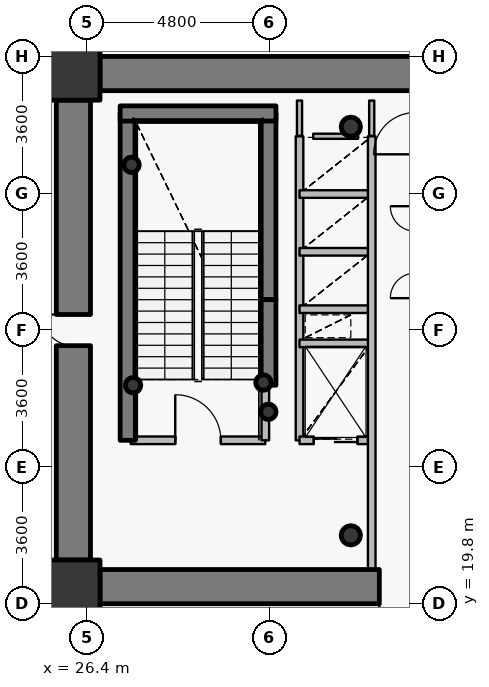
"""IFC4 building model, lengths in metres.
Left out: names, types, materials, properties, quantities, classifications, styles, units other than length and angle.
Written with IfcOpenShell. Run it as: python <this file> out.ifc"""

import sys

from ifc_helpers import new_model, si_unit, direction, frame, frame_2d, origin, origin_2d, place, context, subcontext, project, spatial, rectangle, hollow_circle, extrude, source, transform, mapped, element, fill, save


model = new_model("IFC4")
c1 = context("Model", 3, precision=1e-05, world=origin(), true_north=direction((0.0, 1.0)))
c2 = subcontext(c1, "Body", "Model", "MODEL_VIEW")
j1 = project(units=[si_unit("LENGTHUNIT", "METRE"), si_unit("PLANEANGLEUNIT", "RADIAN")], contexts=[c1])
p1 = place(None, origin())
s1 = spatial("IfcSite", under=j1, at=p1, CompositionType="ELEMENT")
p2 = place(p1, origin())
s2 = spatial("IfcBuilding", under=s1, at=p2, CompositionType="ELEMENT")
p3 = place(p2, frame((0.0, 0.0, 74.4)))
s3 = spatial("IfcBuildingStorey", under=s2, at=p3, CompositionType="ELEMENT", Elevation=74.4)
for number, where, z_axis, x_axis in (
    (1, (26.05, 20.25, 0.0), (0.0, 0.0, 1.0), (1.0, 0.0, 0.0)),
    (2, (26.05, 33.75, 0.0), (0.0, 0.0, 1.0), (1.0, 0.0, 0.0)),
):
    element("IfcColumn", number, at=place(p3, frame(where, z_axis=z_axis, x_axis=x_axis)), inside=s3, PredefinedType="COLUMN", context=c2, shape_type="SweptSolid", body=[
        extrude(rectangle(XDim=1.4, YDim=1.4, at=origin_2d()), origin(), (0.0, 0.0, 1.0), 4.2),
    ])
for number, where, z_axis, x_axis in (
    (3, (33.35, 21.6, 0.0), (0.0, 0.0, 1.0), (1.0, 0.0, 0.0)),
    (4, (33.35, 32.35, 0.0), (0.0, 0.0, 1.0), (1.0, 0.0, 0.0)),
):
    element("IfcColumn", number, at=place(p3, frame(where, z_axis=z_axis, x_axis=x_axis)), inside=s3, PredefinedType="COLUMN", context=c2, shape_type="SweptSolid", body=[
        extrude(hollow_circle(Radius=0.254, WallThickness=0.02, at=origin_2d()), origin(), (0.0, 0.0, 1.0), 4.2),
    ])
p4 = place(p3, frame((27.48, 24.1, 0.0), z_axis=(0.0, 0.0, 1.0), x_axis=(0.0, 1.0, 0.0)))
e5 = element("IfcWall", 5, at=p4, inside=s3, PredefinedType="SHEAR", context=c2, shape_type="SweptSolid", body=[
    extrude(rectangle(XDim=8.6, YDim=0.4, at=frame_2d((4.3, 0.0))), origin(), (0.0, 0.0, 1.0), 4.2),
])
p5 = place(p3, frame((31.18, 27.8, 0.0), z_axis=(0.0, 0.0, 1.0), x_axis=(0.0, 1.0, 0.0)))
e6 = element("IfcWall", 6, at=p5, inside=s3, PredefinedType="SHEAR", context=c2, shape_type="SweptSolid", body=[
    extrude(rectangle(XDim=4.9, YDim=0.4, at=frame_2d((2.45, 0.0))), origin(), (0.0, 0.0, 1.0), 4.2),
])
p6 = place(p3, frame((27.28, 32.7, 0.0), z_axis=(0.0, 0.0, 1.0), x_axis=(1.0, 0.0, 0.0)))
e7 = element("IfcWall", 7, at=p6, inside=s3, PredefinedType="SHEAR", context=c2, shape_type="SweptSolid", body=[
    extrude(rectangle(XDim=4.1, YDim=0.4, at=frame_2d((2.05, 0.0))), origin(), (0.0, 0.0, 1.0), 4.2),
])
for number, where, z_axis, x_axis in (
    (8, (27.58, 31.35, 0.0), (0.0, 0.0, 1.0), (1.0, 0.0, 0.0)),
    (9, (31.05, 25.62, 0.0), (0.0, 0.0, 1.0), (1.0, 0.0, 0.0)),
    (10, (31.18, 24.85, 0.0), (0.0, 0.0, 1.0), (1.0, 0.0, 0.0)),
    (11, (27.62, 25.55, 0.0), (0.0, 0.0, 1.0), (1.0, 0.0, 0.0)),
):
    element("IfcColumn", number, at=place(p3, frame(where, z_axis=z_axis, x_axis=x_axis)), inside=s3, PredefinedType="COLUMN", context=c2, shape_type="SweptSolid", body=[
        extrude(hollow_circle(Radius=0.203, WallThickness=0.016, at=origin_2d()), origin(), (0.0, 0.0, 1.0), 4.2),
    ])
p7 = place(p3, frame((26.75, 33.75, 0.0), z_axis=(0.0, 0.0, 1.0), x_axis=(1.0, 0.0, 0.0)))
e12 = element("IfcWall", 12, at=p7, inside=s3, PredefinedType="SHEAR", context=c2, shape_type="SweptSolid", body=[
    extrude(rectangle(XDim=18.5, YDim=0.9, at=frame_2d((9.25, 0.0))), origin(), (0.0, 0.0, 1.0), 3.4),
])
p8 = place(p3, frame((45.25, 20.25, 0.0), z_axis=(0.0, 0.0, 1.0), x_axis=(-1.0, 0.0, 0.0)))
e13 = element("IfcWall", 13, at=p8, inside=s3, PredefinedType="SHEAR", context=c2, shape_type="SweptSolid", body=[
    extrude(rectangle(XDim=18.5, YDim=0.9, at=frame_2d((9.25, 0.0))), origin(), (0.0, 0.0, 1.0), 3.4),
])
p9 = place(p8, frame((10.0, 0.0, 0.0)))
e14 = element("IfcOpeningElement", 14, at=p9, cuts=e13, PredefinedType="OPENING", context=c2, shape_type="SweptSolid", body=[
    extrude(rectangle(XDim=1.15, YDim=2.15, at=origin_2d()), frame((0.575, 0.46, 1.075), z_axis=(0.0, -1.0, 0.0), x_axis=(1.0, 0.0, 0.0)), (0.0, 0.0, 1.0), 0.92),
])
p10 = place(p3, frame((26.05, 20.95, 0.0), z_axis=(0.0, 0.0, 1.0), x_axis=(0.0, 1.0, 0.0)))
e15 = element("IfcWall", 15, at=p10, inside=s3, PredefinedType="SHEAR", context=c2, shape_type="SweptSolid", body=[
    extrude(rectangle(XDim=12.1, YDim=0.9, at=frame_2d((6.05, 0.0))), origin(), (0.0, 0.0, 1.0), 3.4),
])
p11 = place(p10, frame((5.64, 0.0, 0.0)))
e16 = element("IfcOpeningElement", 16, at=p11, cuts=e15, PredefinedType="OPENING", context=c2, shape_type="SweptSolid", body=[
    extrude(rectangle(XDim=0.82, YDim=2.1, at=origin_2d()), frame((0.41, 0.46, 1.05), z_axis=(0.0, -1.0, 0.0), x_axis=(1.0, 0.0, 0.0)), (0.0, 0.0, 1.0), 0.92),
])
p12 = place(p3, frame((31.18, 25.55, 0.0), z_axis=(0.0, 0.0, 1.0), x_axis=(0.0, 1.0, 0.0)))
e17 = element("IfcWall", 17, at=p12, inside=s3, PredefinedType="SHEAR", context=c2, shape_type="SweptSolid", body=[
    extrude(rectangle(XDim=2.25, YDim=0.4, at=frame_2d((1.125, 0.0))), origin(), (0.0, 0.0, 1.0), 3.55),
])
p13 = place(p3, frame((27.56, 24.1, 0.0), z_axis=(0.0, 0.0, 1.0), x_axis=(1.0, 0.0, 0.0)))
e18 = element("IfcWall", 18, at=p13, inside=s3, PredefinedType="PARTITIONING", context=c2, shape_type="SweptSolid", body=[
    extrude(rectangle(XDim=3.54, YDim=0.2, at=frame_2d((1.77, 0.0))), origin(), (0.0, 0.0, 1.0), 3.95),
])
p14 = place(p13, frame((1.17, 0.0, 0.0)))
e19 = element("IfcOpeningElement", 19, at=p14, cuts=e18, PredefinedType="OPENING", context=c2, shape_type="SweptSolid", body=[
    extrude(rectangle(XDim=1.2, YDim=2.15, at=origin_2d()), frame((0.6, 0.11, 1.075), z_axis=(0.0, -1.0, 0.0), x_axis=(1.0, 0.0, 0.0)), (0.0, 0.0, 1.0), 0.22),
])
p15 = place(p3, frame((31.1, 24.1, 0.0), z_axis=(0.0, 0.0, 1.0), x_axis=(0.0, 1.0, 0.0)))
e20 = element("IfcWall", 20, at=p15, inside=s3, PredefinedType="PARTITIONING", context=c2, shape_type="SweptSolid", body=[
    extrude(rectangle(XDim=1.44, YDim=0.2, at=frame_2d((0.72, 0.0))), origin(), (0.0, 0.0, 1.0), 3.95),
])
p16 = place(p3, frame((32.0, 24.1, 0.0), z_axis=(0.0, 0.0, 1.0), x_axis=(0.0, 1.0, 0.0)))
e21 = element("IfcWall", 21, at=p16, inside=s3, PredefinedType="PARTITIONING", context=c2, shape_type="SweptSolid", body=[
    extrude(rectangle(XDim=8.0, YDim=0.2, at=frame_2d((4.0, 0.0))), origin(), (0.0, 0.0, 1.0), 3.95),
])
p17 = place(p3, frame((32.0, 24.1, 0.0), z_axis=(0.0, 0.0, 1.0), x_axis=(1.0, 0.0, 0.0)))
e22 = element("IfcWall", 22, at=p17, inside=s3, PredefinedType="PARTITIONING", context=c2, shape_type="SweptSolid", body=[
    extrude(rectangle(XDim=1.9, YDim=0.2, at=frame_2d((0.95, 0.0))), origin(), (0.0, 0.0, 1.0), 3.535),
])
p18 = place(p17, frame((0.375, 0.0, 0.0)))
e23 = element("IfcOpeningElement", 23, at=p18, cuts=e22, PredefinedType="OPENING", context=c2, shape_type="SweptSolid", body=[
    extrude(rectangle(XDim=1.15, YDim=2.15, at=origin_2d()), frame((0.575, 0.11, 1.075), z_axis=(0.0, -1.0, 0.0), x_axis=(1.0, 0.0, 0.0)), (0.0, 0.0, 1.0), 0.22),
])
for number, where, z_axis, x_axis in (
    (24, (32.0, 26.65, 0.0), (0.0, 0.0, 1.0), (1.0, 0.0, 0.0)),
    (25, (32.0, 27.55, 0.0), (0.0, 0.0, 1.0), (1.0, 0.0, 0.0)),
    (26, (32.0, 29.06, 0.0), (0.0, 0.0, 1.0), (1.0, 0.0, 0.0)),
    (27, (32.0, 30.58, 0.0), (0.0, 0.0, 1.0), (1.0, 0.0, 0.0)),
):
    element("IfcWall", number, at=place(p3, frame(where, z_axis=z_axis, x_axis=x_axis)), inside=s3, PredefinedType="PARTITIONING", context=c2, shape_type="SweptSolid", body=[
        extrude(rectangle(XDim=1.9, YDim=0.2, at=frame_2d((0.95, 0.0))), origin(), (0.0, 0.0, 1.0), 3.535),
    ])
p19 = place(p3, frame((33.9, 20.7, 0.0), z_axis=(0.0, 0.0, 1.0), x_axis=(0.0, 1.0, 0.0)))
e28 = element("IfcWall", 28, at=p19, inside=s3, PredefinedType="PARTITIONING", context=c2, shape_type="SweptSolid", body=[
    extrude(rectangle(XDim=11.4, YDim=0.2, at=frame_2d((5.7, 0.0))), origin(), (0.0, 0.0, 1.0), 3.535),
])
p20 = place(p3, frame((32.36, 32.1, 0.0), z_axis=(0.0, 0.0, 1.0), x_axis=(1.0, 0.0, 0.0)))
e29 = element("IfcWall", 29, at=p20, inside=s3, PredefinedType="PARTITIONING", context=c2, shape_type="SweptSolid", body=[
    extrude(rectangle(XDim=1.18, YDim=0.135, at=frame_2d((0.59, 0.0))), origin(), (0.0, 0.0, 1.0), 3.535),
])
p21 = place(p3, frame((32.0, 33.04, 0.0), z_axis=(0.0, 0.0, 1.0), x_axis=(0.0, -1.0, 0.0)))
e30 = element("IfcWall", 30, at=p21, inside=s3, PredefinedType="PARTITIONING", context=c2, shape_type="SweptSolid", body=[
    extrude(rectangle(XDim=0.93, YDim=0.135, at=frame_2d((0.465, 0.0))), origin(), (0.0, 0.0, 1.0), 3.485),
])
p22 = place(p3, frame((33.9, 32.11, 0.0), z_axis=(0.0, 0.0, 1.0), x_axis=(0.0, 1.0, 0.0)))
e31 = element("IfcWall", 31, at=p22, inside=s3, PredefinedType="PARTITIONING", context=c2, shape_type="SweptSolid", body=[
    extrude(rectangle(XDim=0.93, YDim=0.135, at=frame_2d((0.465, 0.0))), origin(), (0.0, 0.0, 1.0), 3.535),
])
p23 = place(p3, frame((26.74, 34.2, 0.0), z_axis=(0.0, 0.0, 1.0), x_axis=(-1.0, 0.0, 0.0)))
e32 = element("IfcWall", 32, at=p23, inside=s3, PredefinedType="PARTITIONING", context=c2, shape_type="SweptSolid", body=[
    extrude(rectangle(XDim=1.14, YDim=0.135, at=frame_2d((0.57, 0.0))), origin(), (0.0, 0.0, 1.0), 3.285),
])
p24 = place(p3, frame((25.6, 33.893, 0.0), z_axis=(0.0, 0.0, 1.0), x_axis=(0.0, -1.0, 0.0)))
e33 = element("IfcWall", 33, at=p24, inside=s3, PredefinedType="PARTITIONING", context=c2, shape_type="SweptSolid", body=[
    extrude(rectangle(XDim=0.833, YDim=0.135, at=frame_2d((0.416, 0.0))), origin(), (0.0, 0.0, 1.0), 3.95),
])
p25 = place(p3, frame((25.6, 20.94, 0.0), z_axis=(0.0, 0.0, 1.0), x_axis=(0.0, -1.0, 0.0)))
e34 = element("IfcWall", 34, at=p25, inside=s3, PredefinedType="PARTITIONING", context=c2, shape_type="SweptSolid", body=[
    extrude(rectangle(XDim=1.14, YDim=0.135, at=frame_2d((0.57, 0.0))), origin(), (0.0, 0.0, 1.0), 3.95),
])
p26 = place(p3, frame((25.907, 19.8, 0.0), z_axis=(0.0, 0.0, 1.0), x_axis=(1.0, 0.0, 0.0)))
e35 = element("IfcWall", 35, at=p26, inside=s3, PredefinedType="PARTITIONING", context=c2, shape_type="SweptSolid", body=[
    extrude(rectangle(XDim=0.833, YDim=0.135, at=frame_2d((0.416, 0.0))), origin(), (0.0, 0.0, 1.0), 3.285),
])
m1 = source(origin(), c2, "Body", "SweptSolid", [
    extrude(rectangle(XDim=0.82, YDim=2.1, at=origin_2d()), frame((0.41, 0.025, 1.05), z_axis=(0.0, -1.0, 0.0), x_axis=(1.0, 0.0, 0.0)), (0.0, 0.0, 1.0), 0.05),
])
p27 = place(p11, origin())
e36 = element("IfcDoor", 36, at=p27, inside=s3, OperationType="SINGLE_SWING_RIGHT", PredefinedType="DOOR", context=c2, shape_type="MappedRepresentation", body=[
    mapped(m1, transform((0.0, 0.0, 0.0), x_axis=(1.0, 0.0, 0.0), y_axis=(0.0, 1.0, 0.0), z_axis=(0.0, 0.0, 1.0), scale=1.0)),
])
fill(e16, e36)
m2 = source(origin(), c2, "Body", "SweptSolid", [
    extrude(rectangle(XDim=1.15, YDim=2.15, at=origin_2d()), frame((0.575, 0.025, 1.075), z_axis=(0.0, -1.0, 0.0), x_axis=(1.0, 0.0, 0.0)), (0.0, 0.0, 1.0), 0.05),
])
p28 = place(p9, origin())
e37 = element("IfcDoor", 37, at=p28, inside=s3, OperationType="SINGLE_SWING_RIGHT", PredefinedType="DOOR", context=c2, shape_type="MappedRepresentation", body=[
    mapped(m2, transform((0.0, 0.0, 0.0), x_axis=(1.0, 0.0, 0.0), y_axis=(0.0, 1.0, 0.0), z_axis=(0.0, 0.0, 1.0), scale=1.0)),
])
fill(e14, e37)
m3 = source(origin(), c2, "Body", "SweptSolid", [
    extrude(rectangle(XDim=1.2, YDim=2.15, at=origin_2d()), frame((0.6, 0.025, 1.075), z_axis=(0.0, -1.0, 0.0), x_axis=(1.0, 0.0, 0.0)), (0.0, 0.0, 1.0), 0.05),
])
p29 = place(p14, origin())
e38 = element("IfcDoor", 38, at=p29, inside=s3, OperationType="SINGLE_SWING_LEFT", PredefinedType="DOOR", context=c2, shape_type="MappedRepresentation", body=[
    mapped(m3, transform((0.0, 0.0, 0.0), x_axis=(1.0, 0.0, 0.0), y_axis=(0.0, 1.0, 0.0), z_axis=(0.0, 0.0, 1.0), scale=1.0)),
])
fill(e19, e38)
m4 = source(origin(), c2, "Body", "SweptSolid", [
    extrude(rectangle(XDim=1.15, YDim=2.15, at=origin_2d()), frame((0.575, 0.025, 1.075), z_axis=(0.0, -1.0, 0.0), x_axis=(1.0, 0.0, 0.0)), (0.0, 0.0, 1.0), 0.05),
])
p30 = place(p18, origin())
e39 = element("IfcDoor", 39, at=p30, inside=s3, OperationType="DOUBLE_DOOR_SLIDING", PredefinedType="USERDEFINED", context=c2, shape_type="MappedRepresentation", body=[
    mapped(m4, transform((0.0, 0.0, 0.0), x_axis=(1.0, 0.0, 0.0), y_axis=(0.0, 1.0, 0.0), z_axis=(0.0, 0.0, 1.0), scale=1.0)),
])
fill(e23, e39)
save(model, sys.argv[1])
